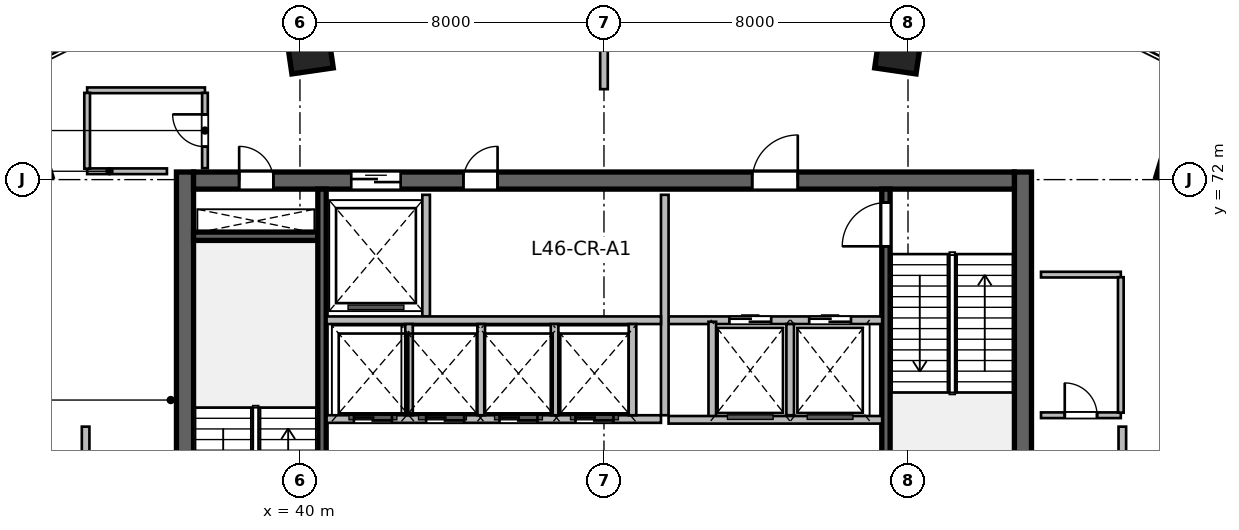
"""IFC4 building model, lengths in metres.
Left out: names, types, materials, properties, quantities, classifications, styles, units other than length and angle.
Written with IfcOpenShell. Run it as: python <this file> out.ifc"""

import sys

from ifc_helpers import new_model, si_unit, direction, frame, frame_2d, origin, origin_2d, place, context, subcontext, project, spatial, rectangle, extrude, source, transform, mapped, element, fill, save


model = new_model("IFC4")
c1 = context("Model", 3, precision=1e-05, world=origin(), true_north=direction((0.0, 1.0)))
c2 = subcontext(c1, "Body", "Model", "MODEL_VIEW")
j1 = project(units=[si_unit("LENGTHUNIT", "METRE"), si_unit("PLANEANGLEUNIT", "RADIAN")], contexts=[c1])
p1 = place(None, origin())
s1 = spatial("IfcSite", under=j1, at=p1, CompositionType="ELEMENT")
p2 = place(p1, origin())
s2 = spatial("IfcBuilding", under=s1, at=p2, CompositionType="ELEMENT")
p3 = place(p2, frame((0.0, 0.0, 189.6)))
s3 = spatial("IfcBuildingStorey", under=s2, at=p3, CompositionType="ELEMENT", Elevation=189.6)
m1 = source(origin(), c2, "Body", "SweptSolid", [
    extrude(rectangle(XDim=12.0, YDim=0.45, at=frame_2d((6.0, 0.0))), origin(), (0.0, 0.0, 1.0), 4.8),
])
for number, where, z_axis, x_axis in (
    (1, (36.975, 60.2, 0.0), (0.0, 0.0, 1.0), (0.0, 1.0, 0.0)),
    (2, (59.025, 60.2, 0.0), (0.0, 0.0, 1.0), (0.0, 1.0, 0.0)),
):
    element("IfcWall", number, at=place(p3, frame(where, z_axis=z_axis, x_axis=x_axis)), inside=s3, PredefinedType="SHEAR", context=c2, shape_type="MappedRepresentation", body=[
        mapped(m1, transform((0.0, 0.0, 0.0), scale=1.0)),
    ])
m2 = source(origin(), c2, "Body", "SweptSolid", [
    extrude(rectangle(XDim=21.6, YDim=0.45, at=frame_2d((10.8, 0.0))), origin(), (0.0, 0.0, 1.0), 4.8),
])
p4 = place(p3, frame((37.2, 71.975, 0.0), z_axis=(0.0, 0.0, 1.0), x_axis=(1.0, 0.0, 0.0)))
e3 = element("IfcWall", 3, at=p4, inside=s3, PredefinedType="SHEAR", context=c2, shape_type="MappedRepresentation", body=[
    mapped(m2, transform((0.0, 0.0, 0.0), scale=1.0)),
])
p5 = place(p4, frame((1.2, 0.0, 0.0)))
e4 = element("IfcOpeningElement", 4, at=p5, cuts=e3, PredefinedType="OPENING", context=c2, shape_type="SweptSolid", body=[
    extrude(rectangle(XDim=0.9, YDim=2.1, at=frame_2d((0.45, 1.05))), frame((0.0, 0.235, 0.0), z_axis=(0.0, -1.0, 0.0), x_axis=(1.0, 0.0, 0.0)), (0.0, 0.0, 1.0), 0.47),
])
p6 = place(p4, frame((14.7, 0.0, 0.0)))
e5 = element("IfcOpeningElement", 5, at=p6, cuts=e3, PredefinedType="OPENING", context=c2, shape_type="SweptSolid", body=[
    extrude(rectangle(XDim=1.2, YDim=2.15, at=frame_2d((0.6, 1.075))), frame((0.0, 0.235, 0.0), z_axis=(0.0, -1.0, 0.0), x_axis=(1.0, 0.0, 0.0)), (0.0, 0.0, 1.0), 0.47),
])
p7 = place(p4, frame((4.15, 0.0, 0.0)))
e6 = element("IfcOpeningElement", 6, at=p7, cuts=e3, PredefinedType="OPENING", context=c2, shape_type="SweptSolid", body=[
    extrude(rectangle(XDim=1.3, YDim=2.15, at=frame_2d((0.65, 1.075))), frame((0.0, 0.235, 0.0), z_axis=(0.0, -1.0, 0.0), x_axis=(1.0, 0.0, 0.0)), (0.0, 0.0, 1.0), 0.47),
])
p8 = place(p4, frame((7.1, 0.0, 0.0)))
e7 = element("IfcOpeningElement", 7, at=p8, cuts=e3, PredefinedType="OPENING", context=c2, shape_type="SweptSolid", body=[
    extrude(rectangle(XDim=0.9, YDim=2.1, at=frame_2d((0.45, 1.05))), frame((0.0, 0.235, 0.0), z_axis=(0.0, -1.0, 0.0), x_axis=(1.0, 0.0, 0.0)), (0.0, 0.0, 1.0), 0.47),
])
m3 = source(origin(), c2, "Body", "SweptSolid", [
    extrude(rectangle(XDim=3.27, YDim=0.22, at=frame_2d((1.635, 0.0))), origin(), (0.0, 0.0, 1.0), 4.8),
])
p9 = place(p3, frame((37.2, 70.51, 0.0), z_axis=(0.0, 0.0, 1.0), x_axis=(1.0, 0.0, 0.0)))
e8 = element("IfcWall", 8, at=p9, inside=s3, PredefinedType="SHEAR", context=c2, shape_type="MappedRepresentation", body=[
    mapped(m3, transform((0.0, 0.0, 0.0), scale=1.0)),
])
m4 = source(origin(), c2, "Body", "SweptSolid", [
    extrude(rectangle(XDim=11.1, YDim=0.22, at=frame_2d((5.55, 0.0))), origin(), (0.0, 0.0, 1.0), 4.8),
])
p10 = place(p3, frame((40.58, 60.65, 0.0), z_axis=(0.0, 0.0, 1.0), x_axis=(0.0, 1.0, 0.0)))
e9 = element("IfcWall", 9, at=p10, inside=s3, PredefinedType="SHEAR", context=c2, shape_type="MappedRepresentation", body=[
    mapped(m4, transform((0.0, 0.0, 0.0), scale=1.0)),
])
p11 = place(p3, frame((55.42, 60.65, 0.0), z_axis=(0.0, 0.0, 1.0), x_axis=(0.0, 1.0, 0.0)))
e10 = element("IfcWall", 10, at=p11, inside=s3, PredefinedType="SHEAR", context=c2, shape_type="MappedRepresentation", body=[
    mapped(m4, transform((0.0, 0.0, 0.0), scale=1.0)),
])
p12 = place(p11, frame((9.595, 0.0, 0.0)))
e11 = element("IfcOpeningElement", 11, at=p12, cuts=e10, PredefinedType="OPENING", context=c2, shape_type="SweptSolid", body=[
    extrude(rectangle(XDim=1.15, YDim=2.15, at=frame_2d((0.575, 1.075))), frame((0.0, 0.12, 0.0), z_axis=(0.0, -1.0, 0.0), x_axis=(1.0, 0.0, 0.0)), (0.0, 0.0, 1.0), 0.24),
])
m5 = source(origin(), c2, "Body", "SweptSolid", [
    extrude(rectangle(XDim=1.1, YDim=1.1, at=origin_2d()), origin(), (0.0, 0.0, 1.0), 4.8),
])
for number, where, z_axis, x_axis in (
    (12, (32.791, 72.442, 0.0), (0.0, 0.0, 1.0), (-0.289, 0.957, 0.0)),
    (13, (40.253, 75.404, 0.0), (0.0, 0.0, 1.0), (-0.143, 0.99, 0.0)),
    (14, (55.747, 75.404, 0.0), (0.0, 0.0, 1.0), (0.143, 0.99, 0.0)),
    (15, (63.209, 72.442, 0.0), (0.0, 0.0, 1.0), (0.289, 0.957, 0.0)),
):
    element("IfcColumn", number, at=place(p3, frame(where, z_axis=z_axis, x_axis=x_axis)), inside=s3, PredefinedType="COLUMN", context=c2, shape_type="MappedRepresentation", body=[
        mapped(m5, transform((0.0, 0.0, 0.0), scale=1.0)),
    ])
m6 = source(origin(), c2, "Body", "SweptSolid", [
    extrude(rectangle(XDim=5.62, YDim=0.2, at=frame_2d((2.81, 0.0))), origin(), (0.0, 0.0, 1.0), 4.48),
])
p13 = place(p3, frame((49.7, 68.3, 0.0), z_axis=(0.0, 0.0, 1.0), x_axis=(1.0, 0.0, 0.0)))
e16 = element("IfcWall", 16, at=p13, inside=s3, PredefinedType="SOLIDWALL", context=c2, shape_type="MappedRepresentation", body=[
    mapped(m6, transform((0.0, 0.0, 0.0), scale=1.0)),
])
p14 = place(p13, frame((1.6, 0.0, 0.0)))
e17 = element("IfcOpeningElement", 17, at=p14, cuts=e16, PredefinedType="OPENING", context=c2, shape_type="SweptSolid", body=[
    extrude(rectangle(XDim=1.1, YDim=2.15, at=frame_2d((0.55, 1.075))), frame((0.0, 0.11, 0.0), z_axis=(0.0, -1.0, 0.0), x_axis=(1.0, 0.0, 0.0)), (0.0, 0.0, 1.0), 0.22),
])
p15 = place(p13, frame((3.7, 0.0, 0.0)))
e18 = element("IfcOpeningElement", 18, at=p15, cuts=e16, PredefinedType="OPENING", context=c2, shape_type="SweptSolid", body=[
    extrude(rectangle(XDim=1.1, YDim=2.15, at=frame_2d((0.55, 1.075))), frame((0.0, 0.11, 0.0), z_axis=(0.0, -1.0, 0.0), x_axis=(1.0, 0.0, 0.0)), (0.0, 0.0, 1.0), 0.22),
])
m7 = source(origin(), c2, "Body", "SweptSolid", [
    extrude(rectangle(XDim=5.8, YDim=0.2, at=frame_2d((2.9, 0.0))), origin(), (0.0, 0.0, 1.0), 4.48),
])
p16 = place(p3, frame((49.6, 65.8, 0.0), z_axis=(0.0, 0.0, 1.0), x_axis=(0.0, 1.0, 0.0)))
e19 = element("IfcWall", 19, at=p16, inside=s3, PredefinedType="SOLIDWALL", context=c2, shape_type="MappedRepresentation", body=[
    mapped(m7, transform((0.0, 0.0, 0.0), scale=1.0)),
])
m8 = source(origin(), c2, "Body", "SweptSolid", [
    extrude(rectangle(XDim=2.58, YDim=0.2, at=frame_2d((1.29, 0.0))), origin(), (0.0, 0.0, 1.0), 4.48),
])
p17 = place(p3, frame((50.85, 65.68, 0.0), z_axis=(0.0, 0.0, 1.0), x_axis=(0.0, 1.0, 0.0)))
e20 = element("IfcWall", 20, at=p17, inside=s3, PredefinedType="SOLIDWALL", context=c2, shape_type="MappedRepresentation", body=[
    mapped(m8, transform((0.0, 0.0, 0.0), scale=1.0)),
])
m9 = source(origin(), c2, "Body", "SweptSolid", [
    extrude(rectangle(XDim=2.4, YDim=0.2, at=frame_2d((1.2, 0.0))), origin(), (0.0, 0.0, 1.0), 4.48),
])
p18 = place(p3, frame((52.9, 65.8, 0.0), z_axis=(0.0, 0.0, 1.0), x_axis=(0.0, 1.0, 0.0)))
e21 = element("IfcWall", 21, at=p18, inside=s3, PredefinedType="SOLIDWALL", context=c2, shape_type="MappedRepresentation", body=[
    mapped(m9, transform((0.0, 0.0, 0.0), scale=1.0)),
])
p19 = place(p3, frame((49.7, 65.68, 0.0), z_axis=(0.0, 0.0, 1.0), x_axis=(1.0, 0.0, 0.0)))
e22 = element("IfcWall", 22, at=p19, inside=s3, PredefinedType="SOLIDWALL", context=c2, shape_type="MappedRepresentation", body=[
    mapped(m6, transform((0.0, 0.0, 0.0), scale=1.0)),
])
m10 = source(origin(), c2, "Body", "SweptSolid", [
    extrude(rectangle(XDim=3.2, YDim=0.2, at=frame_2d((1.6, 0.0))), origin(), (0.0, 0.0, 1.0), 4.48),
])
p20 = place(p3, frame((43.32, 68.4, 0.0), z_axis=(0.0, 0.0, 1.0), x_axis=(0.0, 1.0, 0.0)))
e23 = element("IfcWall", 23, at=p20, inside=s3, PredefinedType="SOLIDWALL", context=c2, shape_type="MappedRepresentation", body=[
    mapped(m10, transform((0.0, 0.0, 0.0), scale=1.0)),
])
m11 = source(origin(), c2, "Body", "SweptSolid", [
    extrude(rectangle(XDim=8.8, YDim=0.2, at=frame_2d((4.4, 0.0))), origin(), (0.0, 0.0, 1.0), 4.48),
])
p21 = place(p3, frame((40.7, 68.3, 0.0), z_axis=(0.0, 0.0, 1.0), x_axis=(1.0, 0.0, 0.0)))
e24 = element("IfcWall", 24, at=p21, inside=s3, PredefinedType="SOLIDWALL", context=c2, shape_type="MappedRepresentation", body=[
    mapped(m11, transform((0.0, 0.0, 0.0), scale=1.0)),
])
p22 = place(p3, frame((40.7, 65.7, 0.0), z_axis=(0.0, 0.0, 1.0), x_axis=(1.0, 0.0, 0.0)))
e25 = element("IfcWall", 25, at=p22, inside=s3, PredefinedType="SOLIDWALL", context=c2, shape_type="MappedRepresentation", body=[
    mapped(m11, transform((0.0, 0.0, 0.0), scale=1.0)),
])
p23 = place(p22, frame((0.72, 0.0, 0.0)))
e26 = element("IfcOpeningElement", 26, at=p23, cuts=e25, PredefinedType="OPENING", context=c2, shape_type="SweptSolid", body=[
    extrude(rectangle(XDim=1.0, YDim=2.15, at=frame_2d((0.5, 1.075))), frame((0.0, 0.11, 0.0), z_axis=(0.0, -1.0, 0.0), x_axis=(1.0, 0.0, 0.0)), (0.0, 0.0, 1.0), 0.22),
])
p24 = place(p22, frame((2.62, 0.0, 0.0)))
e27 = element("IfcOpeningElement", 27, at=p24, cuts=e25, PredefinedType="OPENING", context=c2, shape_type="SweptSolid", body=[
    extrude(rectangle(XDim=1.0, YDim=2.15, at=frame_2d((0.5, 1.075))), frame((0.0, 0.11, 0.0), z_axis=(0.0, -1.0, 0.0), x_axis=(1.0, 0.0, 0.0)), (0.0, 0.0, 1.0), 0.22),
])
p25 = place(p22, frame((4.55, 0.0, 0.0)))
e28 = element("IfcOpeningElement", 28, at=p25, cuts=e25, PredefinedType="OPENING", context=c2, shape_type="SweptSolid", body=[
    extrude(rectangle(XDim=1.0, YDim=2.15, at=frame_2d((0.5, 1.075))), frame((0.0, 0.11, 0.0), z_axis=(0.0, -1.0, 0.0), x_axis=(1.0, 0.0, 0.0)), (0.0, 0.0, 1.0), 0.22),
])
p26 = place(p22, frame((6.55, 0.0, 0.0)))
e29 = element("IfcOpeningElement", 29, at=p26, cuts=e25, PredefinedType="OPENING", context=c2, shape_type="SweptSolid", body=[
    extrude(rectangle(XDim=1.0, YDim=2.15, at=frame_2d((0.5, 1.075))), frame((0.0, 0.11, 0.0), z_axis=(0.0, -1.0, 0.0), x_axis=(1.0, 0.0, 0.0)), (0.0, 0.0, 1.0), 0.22),
])
for number, where, z_axis, x_axis in (
    (30, (48.75, 65.8, 0.0), (0.0, 0.0, 1.0), (0.0, 1.0, 0.0)),
    (31, (42.87, 65.8, 0.0), (0.0, 0.0, 1.0), (0.0, 1.0, 0.0)),
    (32, (44.77, 65.8, 0.0), (0.0, 0.0, 1.0), (0.0, 1.0, 0.0)),
    (33, (46.7, 65.8, 0.0), (0.0, 0.0, 1.0), (0.0, 1.0, 0.0)),
):
    element("IfcWall", number, at=place(p3, frame(where, z_axis=z_axis, x_axis=x_axis)), inside=s3, PredefinedType="SOLIDWALL", context=c2, shape_type="MappedRepresentation", body=[
        mapped(m9, transform((0.0, 0.0, 0.0), scale=1.0)),
    ])
m12 = source(origin(), c2, "Body", "SweptSolid", [
    extrude(rectangle(XDim=2.1, YDim=0.15, at=frame_2d((1.05, 0.0))), origin(), (0.0, 0.0, 1.0), 4.48),
])
p27 = place(p3, frame((34.4, 72.22, 0.0), z_axis=(0.0, 0.0, 1.0), x_axis=(1.0, 0.0, 0.0)))
e34 = element("IfcWall", 34, at=p27, inside=s3, PredefinedType="PARTITIONING", context=c2, shape_type="MappedRepresentation", body=[
    mapped(m12, transform((0.0, 0.0, 0.0), scale=1.0)),
])
m13 = source(origin(), c2, "Body", "SweptSolid", [
    extrude(rectangle(XDim=3.1, YDim=0.15, at=frame_2d((1.55, 0.0))), origin(), (0.0, 0.0, 1.0), 2.424),
])
p28 = place(p3, frame((34.4, 74.35, 0.0), z_axis=(0.0, 0.0, 1.0), x_axis=(1.0, 0.0, 0.0)))
e35 = element("IfcWall", 35, at=p28, inside=s3, PredefinedType="PARTITIONING", context=c2, shape_type="MappedRepresentation", body=[
    mapped(m13, transform((0.0, 0.0, 0.0), scale=1.0)),
])
m14 = source(origin(), c2, "Body", "SweptSolid", [
    extrude(rectangle(XDim=1.995, YDim=0.15, at=frame_2d((0.998, 0.0))), origin(), (0.0, 0.0, 1.0), 4.48),
])
p29 = place(p3, frame((34.4, 72.288, 0.0), z_axis=(0.0, 0.0, 1.0), x_axis=(0.0, 1.0, 0.0)))
e36 = element("IfcWall", 36, at=p29, inside=s3, PredefinedType="PARTITIONING", context=c2, shape_type="MappedRepresentation", body=[
    mapped(m14, transform((0.0, 0.0, 0.0), scale=1.0)),
])
m15 = source(origin(), c2, "Body", "SweptSolid", [
    extrude(rectangle(XDim=1.982, YDim=0.15, at=frame_2d((0.991, 0.0))), origin(), (0.0, 0.0, 1.0), 4.48),
])
p30 = place(p3, frame((37.5, 72.3, 0.0), z_axis=(0.0, 0.0, 1.0), x_axis=(0.0, 1.0, 0.0)))
e37 = element("IfcWall", 37, at=p30, inside=s3, PredefinedType="PARTITIONING", context=c2, shape_type="MappedRepresentation", body=[
    mapped(m15, transform((0.0, 0.0, 0.0), scale=1.0)),
])
p31 = place(p30, frame((0.566, 0.0, 0.0)))
e38 = element("IfcOpeningElement", 38, at=p31, cuts=e37, PredefinedType="OPENING", context=c2, shape_type="SweptSolid", body=[
    extrude(rectangle(XDim=0.85, YDim=2.1, at=frame_2d((0.425, 1.05))), frame((0.0, 0.085, 0.0), z_axis=(0.0, -1.0, 0.0), x_axis=(1.0, 0.0, 0.0)), (0.0, 0.0, 1.0), 0.17),
])
p32 = place(p3, frame((59.5, 65.8, 0.0), z_axis=(0.0, 0.0, 1.0), x_axis=(1.0, 0.0, 0.0)))
e39 = element("IfcWall", 39, at=p32, inside=s3, PredefinedType="PARTITIONING", context=c2, shape_type="MappedRepresentation", body=[
    mapped(m12, transform((0.0, 0.0, 0.0), scale=1.0)),
])
p33 = place(p32, frame((0.625, 0.0, 0.0)))
e40 = element("IfcOpeningElement", 40, at=p33, cuts=e39, PredefinedType="OPENING", context=c2, shape_type="SweptSolid", body=[
    extrude(rectangle(XDim=0.85, YDim=2.1, at=frame_2d((0.425, 1.05))), frame((0.0, 0.085, 0.0), z_axis=(0.0, -1.0, 0.0), x_axis=(1.0, 0.0, 0.0)), (0.0, 0.0, 1.0), 0.17),
])
p34 = place(p3, frame((59.5, 69.5, 0.0), z_axis=(0.0, 0.0, 1.0), x_axis=(1.0, 0.0, 0.0)))
e41 = element("IfcWall", 41, at=p34, inside=s3, PredefinedType="PARTITIONING", context=c2, shape_type="MappedRepresentation", body=[
    mapped(m12, transform((0.0, 0.0, 0.0), scale=1.0)),
])
m16 = source(origin(), c2, "Body", "SweptSolid", [
    extrude(rectangle(XDim=3.565, YDim=0.15, at=frame_2d((1.783, 0.0))), origin(), (0.0, 0.0, 1.0), 4.48),
])
p35 = place(p3, frame((61.6, 65.867, 0.0), z_axis=(0.0, 0.0, 1.0), x_axis=(0.0, 1.0, 0.0)))
e42 = element("IfcWall", 42, at=p35, inside=s3, PredefinedType="PARTITIONING", context=c2, shape_type="MappedRepresentation", body=[
    mapped(m16, transform((0.0, 0.0, 0.0), scale=1.0)),
])
m17 = source(origin(), c2, "Body", "SweptSolid", [
    extrude(rectangle(XDim=4.246, YDim=0.2, at=frame_2d((2.123, 0.0))), origin(), (0.0, 0.0, 1.0), 3.772),
])
p36 = place(p3, frame((48.0, 74.38, 0.0), z_axis=(0.0, 0.0, 1.0), x_axis=(0.0, 1.0, 0.0)))
e43 = element("IfcWall", 43, at=p36, inside=s3, PredefinedType="SOLIDWALL", context=c2, shape_type="MappedRepresentation", body=[
    mapped(m17, transform((0.0, 0.0, 0.0), scale=1.0)),
])
m18 = source(origin(), c2, "Body", "SweptSolid", [
    extrude(rectangle(XDim=5.05, YDim=0.2, at=frame_2d((2.525, 0.0))), origin(), (0.0, 0.0, 1.0), 4.48),
])
p37 = place(p3, frame((34.36, 60.45, 0.0), z_axis=(0.0, 0.0, 1.0), x_axis=(0.0, 1.0, 0.0)))
e44 = element("IfcWall", 44, at=p37, inside=s3, PredefinedType="SOLIDWALL", context=c2, shape_type="MappedRepresentation", body=[
    mapped(m18, transform((0.0, 0.0, 0.0), scale=1.0)),
])
p38 = place(p37, frame((1.925, 0.0, 0.0)))
e45 = element("IfcOpeningElement", 45, at=p38, cuts=e44, PredefinedType="OPENING", context=c2, shape_type="SweptSolid", body=[
    extrude(rectangle(XDim=1.2, YDim=2.15, at=frame_2d((0.6, 1.075))), frame((0.0, 0.11, 0.0), z_axis=(0.0, -1.0, 0.0), x_axis=(1.0, 0.0, 0.0)), (0.0, 0.0, 1.0), 0.22),
])
p39 = place(p3, frame((61.64, 60.45, 0.0), z_axis=(0.0, 0.0, 1.0), x_axis=(0.0, 1.0, 0.0)))
e46 = element("IfcWall", 46, at=p39, inside=s3, PredefinedType="SOLIDWALL", context=c2, shape_type="MappedRepresentation", body=[
    mapped(m18, transform((0.0, 0.0, 0.0), scale=1.0)),
])
p40 = place(p39, frame((1.925, 0.0, 0.0)))
e47 = element("IfcOpeningElement", 47, at=p40, cuts=e46, PredefinedType="OPENING", context=c2, shape_type="SweptSolid", body=[
    extrude(rectangle(XDim=1.2, YDim=2.15, at=frame_2d((0.6, 1.075))), frame((0.0, 0.11, 0.0), z_axis=(0.0, -1.0, 0.0), x_axis=(1.0, 0.0, 0.0)), (0.0, 0.0, 1.0), 0.22),
])
m19 = source(origin(), c2, "Body", "SweptSolid", [
    extrude(rectangle(XDim=0.9, YDim=2.1, at=frame_2d((0.45, 1.05))), frame((0.0, 0.025, 0.0), z_axis=(0.0, -1.0, 0.0), x_axis=(1.0, 0.0, 0.0)), (0.0, 0.0, 1.0), 0.05),
])
p41 = place(p5, origin())
e48 = element("IfcDoor", 48, at=p41, inside=s3, OperationType="SINGLE_SWING_LEFT", PredefinedType="DOOR", context=c2, shape_type="MappedRepresentation", body=[
    mapped(m19, transform((0.0, 0.0, 0.0), scale=1.0)),
])
fill(e4, e48)
m20 = source(origin(), c2, "Body", "SweptSolid", [
    extrude(rectangle(XDim=1.15, YDim=2.15, at=frame_2d((0.575, 1.075))), frame((0.0, 0.025, 0.0), z_axis=(0.0, -1.0, 0.0), x_axis=(1.0, 0.0, 0.0)), (0.0, 0.0, 1.0), 0.05),
])
p42 = place(p12, origin())
e49 = element("IfcDoor", 49, at=p42, inside=s3, OperationType="SINGLE_SWING_LEFT", PredefinedType="DOOR", context=c2, shape_type="MappedRepresentation", body=[
    mapped(m20, transform((0.0, 0.0, 0.0), scale=1.0)),
])
fill(e11, e49)
m21 = source(origin(), c2, "Body", "SweptSolid", [
    extrude(rectangle(XDim=1.2, YDim=2.15, at=frame_2d((0.6, 1.075))), frame((0.0, 0.025, 0.0), z_axis=(0.0, -1.0, 0.0), x_axis=(1.0, 0.0, 0.0)), (0.0, 0.0, 1.0), 0.05),
])
p43 = place(p6, origin())
e50 = element("IfcDoor", 50, at=p43, inside=s3, OperationType="SINGLE_SWING_RIGHT", PredefinedType="DOOR", context=c2, shape_type="MappedRepresentation", body=[
    mapped(m21, transform((0.0, 0.0, 0.0), scale=1.0)),
])
fill(e5, e50)
m22 = source(origin(), c2, "Body", "SweptSolid", [
    extrude(rectangle(XDim=1.1, YDim=2.15, at=frame_2d((0.55, 1.075))), frame((0.0, 0.025, 0.0), z_axis=(0.0, -1.0, 0.0), x_axis=(1.0, 0.0, 0.0)), (0.0, 0.0, 1.0), 0.05),
])
p44 = place(p14, origin())
e51 = element("IfcDoor", 51, at=p44, inside=s3, OperationType="DOUBLE_DOOR_SLIDING", PredefinedType="DOOR", context=c2, shape_type="MappedRepresentation", body=[
    mapped(m22, transform((0.0, 0.0, 0.0), scale=1.0)),
])
fill(e17, e51)
p45 = place(p15, origin())
e52 = element("IfcDoor", 52, at=p45, inside=s3, OperationType="DOUBLE_DOOR_SLIDING", PredefinedType="DOOR", context=c2, shape_type="MappedRepresentation", body=[
    mapped(m22, transform((0.0, 0.0, 0.0), scale=1.0)),
])
fill(e18, e52)
m23 = source(origin(), c2, "Body", "SweptSolid", [
    extrude(rectangle(XDim=1.3, YDim=2.15, at=frame_2d((0.65, 1.075))), frame((0.0, 0.025, 0.0), z_axis=(0.0, -1.0, 0.0), x_axis=(1.0, 0.0, 0.0)), (0.0, 0.0, 1.0), 0.05),
])
p46 = place(p7, origin())
e53 = element("IfcDoor", 53, at=p46, inside=s3, OperationType="DOUBLE_DOOR_SLIDING", PredefinedType="DOOR", context=c2, shape_type="MappedRepresentation", body=[
    mapped(m23, transform((0.0, 0.0, 0.0), scale=1.0)),
])
fill(e6, e53)
p47 = place(p8, origin())
e54 = element("IfcDoor", 54, at=p47, inside=s3, OperationType="SINGLE_SWING_RIGHT", PredefinedType="DOOR", context=c2, shape_type="MappedRepresentation", body=[
    mapped(m19, transform((0.0, 0.0, 0.0), scale=1.0)),
])
fill(e7, e54)
m24 = source(origin(), c2, "Body", "SweptSolid", [
    extrude(rectangle(XDim=1.0, YDim=2.15, at=frame_2d((0.5, 1.075))), frame((0.0, 0.025, 0.0), z_axis=(0.0, -1.0, 0.0), x_axis=(1.0, 0.0, 0.0)), (0.0, 0.0, 1.0), 0.05),
])
p48 = place(p23, origin())
e55 = element("IfcDoor", 55, at=p48, inside=s3, OperationType="DOUBLE_DOOR_SLIDING", PredefinedType="DOOR", context=c2, shape_type="MappedRepresentation", body=[
    mapped(m24, transform((0.0, 0.0, 0.0), scale=1.0)),
])
fill(e26, e55)
p49 = place(p24, origin())
e56 = element("IfcDoor", 56, at=p49, inside=s3, OperationType="DOUBLE_DOOR_SLIDING", PredefinedType="DOOR", context=c2, shape_type="MappedRepresentation", body=[
    mapped(m24, transform((0.0, 0.0, 0.0), scale=1.0)),
])
fill(e27, e56)
p50 = place(p25, origin())
e57 = element("IfcDoor", 57, at=p50, inside=s3, OperationType="DOUBLE_DOOR_SLIDING", PredefinedType="DOOR", context=c2, shape_type="MappedRepresentation", body=[
    mapped(m24, transform((0.0, 0.0, 0.0), scale=1.0)),
])
fill(e28, e57)
p51 = place(p26, origin())
e58 = element("IfcDoor", 58, at=p51, inside=s3, OperationType="DOUBLE_DOOR_SLIDING", PredefinedType="DOOR", context=c2, shape_type="MappedRepresentation", body=[
    mapped(m24, transform((0.0, 0.0, 0.0), scale=1.0)),
])
fill(e29, e58)
m25 = source(origin(), c2, "Body", "SweptSolid", [
    extrude(rectangle(XDim=0.85, YDim=2.1, at=frame_2d((0.425, 1.05))), frame((0.0, 0.025, 0.0), z_axis=(0.0, -1.0, 0.0), x_axis=(1.0, 0.0, 0.0)), (0.0, 0.0, 1.0), 0.05),
])
p52 = place(p31, origin())
e59 = element("IfcDoor", 59, at=p52, inside=s3, OperationType="SINGLE_SWING_RIGHT", PredefinedType="DOOR", context=c2, shape_type="MappedRepresentation", body=[
    mapped(m25, transform((0.0, 0.0, 0.0), scale=1.0)),
])
fill(e38, e59)
p53 = place(p33, origin())
e60 = element("IfcDoor", 60, at=p53, inside=s3, OperationType="SINGLE_SWING_LEFT", PredefinedType="DOOR", context=c2, shape_type="MappedRepresentation", body=[
    mapped(m25, transform((0.0, 0.0, 0.0), scale=1.0)),
])
fill(e40, e60)
save(model, sys.argv[1])
